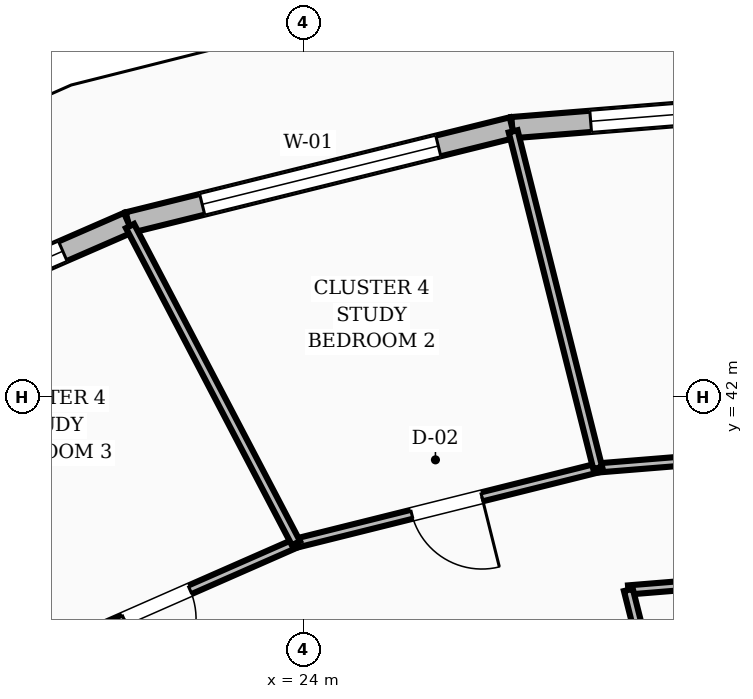
"""IFC4 building model, lengths in metres.
Left out: names, types, materials, properties, quantities, classifications, styles, units other than length and angle.
Written with IfcOpenShell. Run it as: python <this file> out.ifc"""

import sys

from ifc_helpers import new_model, si_unit, direction, frame, frame_2d, origin, place, context, subcontext, project, spatial, rectangle, extrude, element, fill, save


model = new_model("IFC4")
c1 = context("Model", 3, precision=1e-05, world=origin(), true_north=direction((0.0, 1.0)))
c2 = subcontext(c1, "Body", "Model", "MODEL_VIEW")
j1 = project(units=[si_unit("LENGTHUNIT", "METRE"), si_unit("PLANEANGLEUNIT", "RADIAN")], contexts=[c1])
p1 = place(None, origin())
s1 = spatial("IfcSite", under=j1, at=p1, CompositionType="ELEMENT")
p2 = place(p1, origin())
s2 = spatial("IfcBuilding", under=s1, at=p2, CompositionType="ELEMENT")
p3 = place(p2, frame((0.0, 0.0, 95.2)))
s3 = spatial("IfcBuildingStorey", under=s2, at=p3, CompositionType="ELEMENT", Elevation=95.2)
p4 = place(p3, frame((32.0, 45.962, 0.0), z_axis=(0.0, 0.0, 1.0), x_axis=(-0.996787676698, -0.080089497328, 0.0)))
e1 = element("IfcWall", 1, at=p4, inside=s3, PredefinedType="STANDARD", context=c2, shape_type="SweptSolid", body=[
    extrude(rectangle(XDim=5.271, YDim=0.28, at=frame_2d((2.635, 0.0))), origin(), (0.0, 0.0, 1.0), 2.71),
])
p5 = place(p4, frame((1.035, 0.0, 0.8)))
e2 = element("IfcOpeningElement", 2, at=p5, cuts=e1, PredefinedType="OPENING", context=c2, shape_type="SweptSolid", body=[
    extrude(rectangle(XDim=3.2, YDim=1.65, at=frame_2d((1.6, 0.825))), frame((0.0, 0.15, 0.0), z_axis=(0.0, -1.0, 0.0), x_axis=(1.0, 0.0, 0.0)), (0.0, 0.0, 1.0), 0.3),
])
p6 = place(p3, frame((26.746, 45.54, 0.0), z_axis=(0.0, 0.0, 1.0), x_axis=(-0.970735648522, -0.240150579199, 0.0)))
e3 = element("IfcWall", 3, at=p6, inside=s3, PredefinedType="STANDARD", context=c2, shape_type="SweptSolid", body=[
    extrude(rectangle(XDim=5.204, YDim=0.28, at=frame_2d((2.602, 0.0))), origin(), (0.0, 0.0, 1.0), 2.71),
])
p7 = place(p6, frame((1.002, 0.0, 0.8)))
e4 = element("IfcOpeningElement", 4, at=p7, cuts=e3, PredefinedType="OPENING", context=c2, shape_type="SweptSolid", body=[
    extrude(rectangle(XDim=3.2, YDim=1.65, at=frame_2d((1.6, 0.825))), frame((0.0, 0.15, 0.0), z_axis=(0.0, -1.0, 0.0), x_axis=(1.0, 0.0, 0.0)), (0.0, 0.0, 1.0), 0.3),
])
p8 = place(p3, frame((21.695, 44.291, 0.0), z_axis=(0.0, 0.0, 1.0), x_axis=(-0.916680612936, -0.39962063744, 0.0)))
e5 = element("IfcWall", 5, at=p8, inside=s3, PredefinedType="STANDARD", context=c2, shape_type="SweptSolid", body=[
    extrude(rectangle(XDim=5.079, YDim=0.28, at=frame_2d((2.539, 0.0))), origin(), (0.0, 0.0, 1.0), 2.71),
])
p9 = place(p8, frame((0.939, 0.0, 0.8)))
e6 = element("IfcOpeningElement", 6, at=p9, cuts=e5, PredefinedType="OPENING", context=c2, shape_type="SweptSolid", body=[
    extrude(rectangle(XDim=3.2, YDim=1.65, at=frame_2d((1.6, 0.825))), frame((0.0, 0.15, 0.0), z_axis=(0.0, -1.0, 0.0), x_axis=(1.0, 0.0, 0.0)), (0.0, 0.0, 1.0), 0.3),
])
p10 = place(p3, frame((32.0, 39.761, 0.0), z_axis=(0.0, 0.0, 1.0), x_axis=(-0.996709538361, -0.081056129561, 0.0)))
e7 = element("IfcWall", 7, at=p10, inside=s3, PredefinedType="PARTITIONING", context=c2, shape_type="SweptSolid", body=[
    extrude(rectangle(XDim=3.738, YDim=0.12, at=frame_2d((1.869, 0.0))), origin(), (0.0, 0.0, 1.0), 2.71),
])
p11 = place(p3, frame((28.869, 37.094, 0.0), z_axis=(0.0, 0.0, 1.0), x_axis=(-0.243783937168, 0.969829568522, 0.0)))
e8 = element("IfcWall", 8, at=p11, inside=s3, PredefinedType="PARTITIONING", context=c2, shape_type="SweptSolid", body=[
    extrude(rectangle(XDim=2.438, YDim=0.12, at=frame_2d((1.219, 0.0))), origin(), (0.0, 0.0, 1.0), 2.71),
])
p12 = place(p11, frame((0.44, 0.0, 0.0)))
e9 = element("IfcOpeningElement", 9, at=p12, cuts=e8, PredefinedType="OPENING", context=c2, shape_type="SweptSolid", body=[
    extrude(rectangle(XDim=0.86, YDim=2.1, at=frame_2d((0.43, 1.05))), frame((0.0, 0.07, 0.0), z_axis=(0.0, -1.0, 0.0), x_axis=(1.0, 0.0, 0.0)), (0.0, 0.0, 1.0), 0.14),
])
p13 = place(p3, frame((32.0, 41.398, 0.0), z_axis=(0.0, 0.0, 1.0), x_axis=(-0.996739305437, -0.080689261968, 0.0)))
e10 = element("IfcWall", 10, at=p13, inside=s3, PredefinedType="PARTITIONING", context=c2, shape_type="SweptSolid", body=[
    extrude(rectangle(XDim=4.142, YDim=0.12, at=frame_2d((2.071, 0.0))), origin(), (0.0, 0.0, 1.0), 2.71),
])
p14 = place(p13, frame((1.596, 0.0, 0.0)))
e11 = element("IfcOpeningElement", 11, at=p14, cuts=e10, PredefinedType="OPENING", context=c2, shape_type="SweptSolid", body=[
    extrude(rectangle(XDim=0.95, YDim=2.1, at=frame_2d((0.475, 1.05))), frame((0.0, 0.07, 0.0), z_axis=(0.0, -1.0, 0.0), x_axis=(1.0, 0.0, 0.0)), (0.0, 0.0, 1.0), 0.14),
])
p15 = place(p3, frame((27.871, 41.063, 0.0), z_axis=(0.0, 0.0, 1.0), x_axis=(-0.970289731263, -0.241945939016, 0.0)))
e12 = element("IfcWall", 12, at=p15, inside=s3, PredefinedType="PARTITIONING", context=c2, shape_type="SweptSolid", body=[
    extrude(rectangle(XDim=4.092, YDim=0.12, at=frame_2d((2.046, 0.0))), origin(), (0.0, 0.0, 1.0), 2.71),
])
p16 = place(p15, frame((1.571, 0.0, 0.0)))
e13 = element("IfcOpeningElement", 13, at=p16, cuts=e12, PredefinedType="OPENING", context=c2, shape_type="SweptSolid", body=[
    extrude(rectangle(XDim=0.95, YDim=2.1, at=frame_2d((0.475, 1.05))), frame((0.0, 0.07, 0.0), z_axis=(0.0, -1.0, 0.0), x_axis=(1.0, 0.0, 0.0)), (0.0, 0.0, 1.0), 0.14),
])
p17 = place(p3, frame((27.871, 41.063, 0.0), z_axis=(0.0, 0.0, 1.0), x_axis=(-0.243705446154, 0.969849295259, 0.0)))
e14 = element("IfcWall", 14, at=p17, inside=s3, PredefinedType="PARTITIONING", context=c2, shape_type="SweptSolid", body=[
    extrude(rectangle(XDim=4.566, YDim=0.12, at=frame_2d((2.283, 0.0))), origin(), (0.0, 0.0, 1.0), 2.71),
])
p18 = place(p3, frame((23.901, 40.073, 0.0), z_axis=(0.0, 0.0, 1.0), x_axis=(-0.91551399957, -0.40228611285, 0.0)))
e15 = element("IfcWall", 15, at=p18, inside=s3, PredefinedType="PARTITIONING", context=c2, shape_type="SweptSolid", body=[
    extrude(rectangle(XDim=3.996, YDim=0.12, at=frame_2d((1.998, 0.0))), origin(), (0.0, 0.0, 1.0), 2.71),
])
p19 = place(p18, frame((1.523, 0.0, 0.0)))
e16 = element("IfcOpeningElement", 16, at=p19, cuts=e15, PredefinedType="OPENING", context=c2, shape_type="SweptSolid", body=[
    extrude(rectangle(XDim=0.95, YDim=2.1, at=frame_2d((0.475, 1.05))), frame((0.0, 0.07, 0.0), z_axis=(0.0, -1.0, 0.0), x_axis=(1.0, 0.0, 0.0)), (0.0, 0.0, 1.0), 0.14),
])
p20 = place(p3, frame((23.901, 40.073, 0.0), z_axis=(0.0, 0.0, 1.0), x_axis=(-0.463561399352, 0.886064799567, 0.0)))
e17 = element("IfcWall", 17, at=p20, inside=s3, PredefinedType="PARTITIONING", context=c2, shape_type="SweptSolid", body=[
    extrude(rectangle(XDim=4.709, YDim=0.12, at=frame_2d((2.355, 0.0))), origin(), (0.0, 0.0, 1.0), 2.71),
])
p21 = place(p5, origin())
e18 = element("IfcWindow", 18, at=p21, inside=s3, PartitioningType="SINGLE_PANEL", PredefinedType="WINDOW", context=c2, shape_type="SweptSolid", body=[
    extrude(rectangle(XDim=3.2, YDim=1.65, at=frame_2d((1.6, 0.825))), frame((0.0, 0.03, 0.0), z_axis=(0.0, -1.0, 0.0), x_axis=(1.0, 0.0, 0.0)), (0.0, 0.0, 1.0), 0.06),
])
fill(e2, e18)
p22 = place(p7, origin())
e19 = element("IfcWindow", 19, at=p22, inside=s3, PartitioningType="SINGLE_PANEL", PredefinedType="WINDOW", context=c2, shape_type="SweptSolid", body=[
    extrude(rectangle(XDim=3.2, YDim=1.65, at=frame_2d((1.6, 0.825))), frame((0.0, 0.03, 0.0), z_axis=(0.0, -1.0, 0.0), x_axis=(1.0, 0.0, 0.0)), (0.0, 0.0, 1.0), 0.06),
])
fill(e4, e19)
p23 = place(p9, origin())
e20 = element("IfcWindow", 20, at=p23, inside=s3, PartitioningType="SINGLE_PANEL", PredefinedType="WINDOW", context=c2, shape_type="SweptSolid", body=[
    extrude(rectangle(XDim=3.2, YDim=1.65, at=frame_2d((1.6, 0.825))), frame((0.0, 0.03, 0.0), z_axis=(0.0, -1.0, 0.0), x_axis=(1.0, 0.0, 0.0)), (0.0, 0.0, 1.0), 0.06),
])
fill(e6, e20)
p24 = place(p16, origin())
e21 = element("IfcDoor", 21, at=p24, inside=s3, OperationType="SINGLE_SWING_LEFT", PredefinedType="DOOR", context=c2, shape_type="SweptSolid", body=[
    extrude(rectangle(XDim=0.95, YDim=2.1, at=frame_2d((0.475, 1.05))), frame((0.0, 0.025, 0.0), z_axis=(0.0, -1.0, 0.0), x_axis=(1.0, 0.0, 0.0)), (0.0, 0.0, 1.0), 0.05),
])
fill(e13, e21)
p25 = place(p19, origin())
e22 = element("IfcDoor", 22, at=p25, inside=s3, OperationType="SINGLE_SWING_RIGHT", PredefinedType="DOOR", context=c2, shape_type="SweptSolid", body=[
    extrude(rectangle(XDim=0.95, YDim=2.1, at=frame_2d((0.475, 1.05))), frame((0.0, 0.025, 0.0), z_axis=(0.0, -1.0, 0.0), x_axis=(1.0, 0.0, 0.0)), (0.0, 0.0, 1.0), 0.05),
])
fill(e16, e22)
save(model, sys.argv[1])
